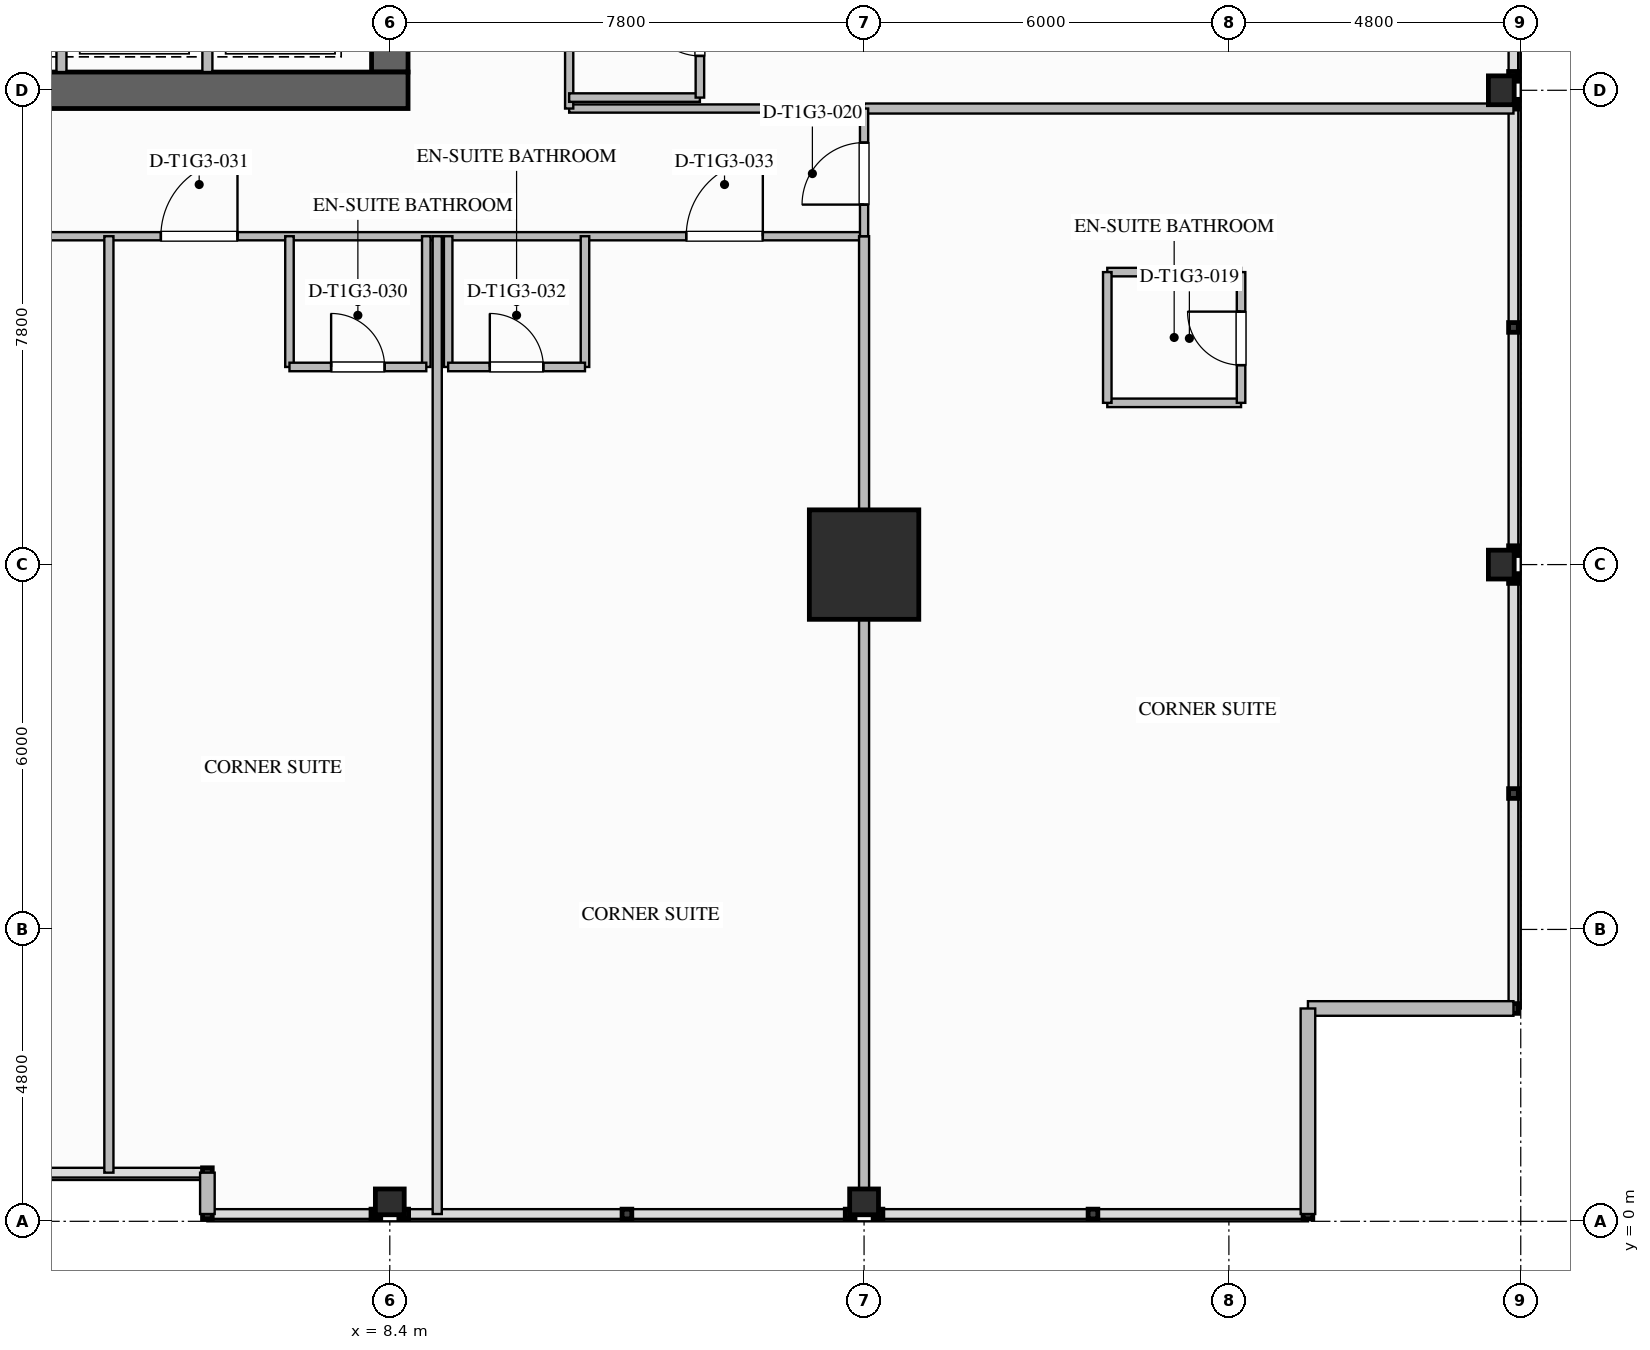
"""IFC4 building model, lengths in metres.
Left out: names, types, materials, properties, quantities, classifications, styles, units other than length and angle.
Written with IfcOpenShell. Run it as: python <this file> out.ifc"""

import sys

from ifc_helpers import new_model, si_unit, direction, frame, frame_2d, origin, origin_2d, place, context, subcontext, project, spatial, rectangle, i_section, extrude, element, fill, save


model = new_model("IFC4")
c1 = context("Model", 3, precision=1e-05, world=origin(), true_north=direction((0.0, 1.0)))
c2 = subcontext(c1, "Body", "Model", "MODEL_VIEW")
j1 = project(units=[si_unit("LENGTHUNIT", "METRE"), si_unit("PLANEANGLEUNIT", "RADIAN")], contexts=[c1])
p1 = place(None, origin())
s1 = spatial("IfcSite", under=j1, at=p1, CompositionType="ELEMENT")
p2 = place(p1, origin())
s2 = spatial("IfcBuilding", under=s1, at=p2, CompositionType="ELEMENT")
p3 = place(p2, frame((0.0, 0.0, 61.2)))
s3 = spatial("IfcBuildingStorey", under=s2, at=p3, CompositionType="ELEMENT", Elevation=61.2)
p4 = place(p3, frame((8.4, 35.1, 0.0), z_axis=(0.0, 0.0, 1.0), x_axis=(0.0, -1.0, 0.0)))
e1 = element("IfcWall", 1, at=p4, inside=s3, PredefinedType="SHEAR", context=c2, shape_type="SweptSolid", body=[
    extrude(rectangle(XDim=16.2, YDim=0.6, at=frame_2d((8.1, 0.0))), origin(), (0.0, 0.0, 1.0), 3.5),
])
p5 = place(p4, frame((3.08, 0.0, 0.0)))
e2 = element("IfcOpeningElement", 2, at=p5, cuts=e1, PredefinedType="OPENING", context=c2, shape_type="SweptSolid", body=[
    extrude(rectangle(XDim=1.12, YDim=2.1, at=frame_2d((0.56, 1.05))), frame((0.0, 0.31, 0.0), z_axis=(0.0, -1.0, 0.0), x_axis=(1.0, 0.0, 0.0)), (0.0, 0.0, 1.0), 0.62),
])
p6 = place(p3, frame((8.7, 18.6, 0.0), z_axis=(0.0, 0.0, 1.0), x_axis=(-1.0, 0.0, 0.0)))
e3 = element("IfcWall", 3, at=p6, inside=s3, PredefinedType="SHEAR", context=c2, shape_type="SweptSolid", body=[
    extrude(rectangle(XDim=17.4, YDim=0.6, at=frame_2d((8.7, 0.0))), origin(), (0.0, 0.0, 1.0), 3.5),
])
p7 = place(p3, frame((16.2, 10.8, 0.0), z_axis=(0.0, 0.0, 1.0), x_axis=(1.0, 0.0, 0.0)))
e4 = element("IfcColumn", 4, at=p7, inside=s3, PredefinedType="COLUMN", context=c2, shape_type="SweptSolid", body=[
    extrude(rectangle(XDim=1.8, YDim=1.8, at=origin_2d()), origin(), (0.0, 0.0, 1.0), 3.5),
])
for number, where, z_axis, x_axis in (
    (5, (26.68, 10.8, 0.0), (0.0, 0.0, 1.0), (1.0, 0.0, 0.0)),
    (6, (26.68, 18.6, 0.0), (0.0, 0.0, 1.0), (1.0, 0.0, 0.0)),
    (7, (8.4, 0.32, 0.0), (0.0, 0.0, 1.0), (0.0, 1.0, 0.0)),
    (8, (16.2, 0.32, 0.0), (0.0, 0.0, 1.0), (0.0, 1.0, 0.0)),
):
    element("IfcColumn", number, at=place(p3, frame(where, z_axis=z_axis, x_axis=x_axis)), inside=s3, PredefinedType="COLUMN", context=c2, shape_type="SweptSolid", body=[
        extrude(i_section(OverallWidth=0.424, OverallDepth=0.474, WebThickness=0.048, FlangeThickness=0.077, FilletRadius=0.03, at=origin_2d()), origin(), (0.0, 0.0, 1.0), 3.497),
    ])
for number, where, z_axis, x_axis in (
    (9, (26.88, 3.5, 0.0), (0.0, 0.0, 1.0), (-1.0, 0.0, 0.0)),
    (10, (23.5, 3.5, 0.0), (0.0, 0.0, 1.0), (0.0, -1.0, 0.0)),
):
    element("IfcWall", number, at=place(p3, frame(where, z_axis=z_axis, x_axis=x_axis)), inside=s3, PredefinedType="STANDARD", context=c2, shape_type="SweptSolid", body=[
        extrude(rectangle(XDim=3.38, YDim=0.24, at=frame_2d((1.69, 0.0))), origin(), (0.0, 0.0, 1.0), 3.24),
    ])
p8 = place(p3, frame((5.4, 0.12, 0.0), z_axis=(0.0, 0.0, 1.0), x_axis=(0.0, 1.0, 0.0)))
e11 = element("IfcWall", 11, at=p8, inside=s3, PredefinedType="STANDARD", context=c2, shape_type="SweptSolid", body=[
    extrude(rectangle(XDim=0.68, YDim=0.24, at=frame_2d((0.34, 0.0))), origin(), (0.0, 0.0, 1.0), 3.24),
])
for number, where, z_axis, x_axis in (
    (12, (3.0, 18.9, 0.0), (0.0, 0.0, 1.0), (0.0, 1.0, 0.0)),
    (13, (5.4, 18.9, 0.0), (0.0, 0.0, 1.0), (0.0, 1.0, 0.0)),
):
    element("IfcWall", number, at=place(p3, frame(where, z_axis=z_axis, x_axis=x_axis)), inside=s3, PredefinedType="PARTITIONING", context=c2, shape_type="SweptSolid", body=[
        extrude(rectangle(XDim=2.88, YDim=0.165, at=frame_2d((1.44, 0.0))), origin(), (0.0, 0.0, 1.0), 3.24),
    ])
p9 = place(p3, frame((-16.2, 16.2, 0.0), z_axis=(0.0, 0.0, 1.0), x_axis=(1.0, 0.0, 0.0)))
e14 = element("IfcWall", 14, at=p9, inside=s3, PredefinedType="PARTITIONING", context=c2, shape_type="SweptSolid", body=[
    extrude(rectangle(XDim=32.4, YDim=0.135, at=frame_2d((16.2, 0.0))), origin(), (0.0, 0.0, 1.0), 3.24),
])
p10 = place(p9, frame((3.285, 0.0, 0.0)))
e15 = element("IfcOpeningElement", 15, at=p10, cuts=e14, PredefinedType="OPENING", context=c2, shape_type="SweptSolid", body=[
    extrude(rectangle(XDim=1.26, YDim=2.2, at=frame_2d((0.63, 1.1))), frame((0.0, 0.077, 0.0), z_axis=(0.0, -1.0, 0.0), x_axis=(1.0, 0.0, 0.0)), (0.0, 0.0, 1.0), 0.155),
])
p11 = place(p9, frame((7.335, 0.0, 0.0)))
e16 = element("IfcOpeningElement", 16, at=p11, cuts=e14, PredefinedType="OPENING", context=c2, shape_type="SweptSolid", body=[
    extrude(rectangle(XDim=1.26, YDim=2.2, at=frame_2d((0.63, 1.1))), frame((0.0, 0.077, 0.0), z_axis=(0.0, -1.0, 0.0), x_axis=(1.0, 0.0, 0.0)), (0.0, 0.0, 1.0), 0.155),
])
p12 = place(p9, frame((15.84, 0.0, 0.0)))
e17 = element("IfcOpeningElement", 17, at=p12, cuts=e14, PredefinedType="OPENING", context=c2, shape_type="SweptSolid", body=[
    extrude(rectangle(XDim=1.26, YDim=2.2, at=frame_2d((0.63, 1.1))), frame((0.0, 0.077, 0.0), z_axis=(0.0, -1.0, 0.0), x_axis=(1.0, 0.0, 0.0)), (0.0, 0.0, 1.0), 0.155),
])
p13 = place(p9, frame((20.835, 0.0, 0.0)))
e18 = element("IfcOpeningElement", 18, at=p13, cuts=e14, PredefinedType="OPENING", context=c2, shape_type="SweptSolid", body=[
    extrude(rectangle(XDim=1.26, YDim=2.2, at=frame_2d((0.63, 1.1))), frame((0.0, 0.077, 0.0), z_axis=(0.0, -1.0, 0.0), x_axis=(1.0, 0.0, 0.0)), (0.0, 0.0, 1.0), 0.155),
])
p14 = place(p9, frame((29.475, 0.0, 0.0)))
e19 = element("IfcOpeningElement", 19, at=p14, cuts=e14, PredefinedType="OPENING", context=c2, shape_type="SweptSolid", body=[
    extrude(rectangle(XDim=1.26, YDim=2.2, at=frame_2d((0.63, 1.1))), frame((0.0, 0.077, 0.0), z_axis=(0.0, -1.0, 0.0), x_axis=(1.0, 0.0, 0.0)), (0.0, 0.0, 1.0), 0.155),
])
p15 = place(p3, frame((11.35, 18.3, 0.0), z_axis=(0.0, 0.0, 1.0), x_axis=(1.0, 0.0, 0.0)))
e20 = element("IfcWall", 20, at=p15, inside=s3, PredefinedType="PARTITIONING", context=c2, shape_type="SweptSolid", body=[
    extrude(rectangle(XDim=4.85, YDim=0.135, at=frame_2d((2.425, 0.0))), origin(), (0.0, 0.0, 1.0), 3.24),
])
p16 = place(p3, frame((11.35, 18.3, 0.0), z_axis=(0.0, 0.0, 1.0), x_axis=(0.0, 1.0, 0.0)))
e21 = element("IfcWall", 21, at=p16, inside=s3, PredefinedType="PARTITIONING", context=c2, shape_type="SweptSolid", body=[
    extrude(rectangle(XDim=17.4, YDim=0.135, at=frame_2d((8.7, 0.0))), origin(), (0.0, 0.0, 1.0), 3.24),
])
p17 = place(p16, frame((3.79, 0.0, 0.0)))
e22 = element("IfcOpeningElement", 22, at=p17, cuts=e21, PredefinedType="OPENING", context=c2, shape_type="SweptSolid", body=[
    extrude(rectangle(XDim=1.26, YDim=2.2, at=frame_2d((0.63, 1.1))), frame((0.0, 0.077, 0.0), z_axis=(0.0, -1.0, 0.0), x_axis=(1.0, 0.0, 0.0)), (0.0, 0.0, 1.0), 0.155),
])
p18 = place(p16, frame((8.419, 0.0, 0.0)))
e23 = element("IfcOpeningElement", 23, at=p18, cuts=e21, PredefinedType="OPENING", context=c2, shape_type="SweptSolid", body=[
    extrude(rectangle(XDim=1.02, YDim=2.15, at=frame_2d((0.51, 1.075))), frame((0.0, 0.077, 0.0), z_axis=(0.0, -1.0, 0.0), x_axis=(1.0, 0.0, 0.0)), (0.0, 0.0, 1.0), 0.155),
])
p19 = place(p16, frame((15.009, 0.0, 0.0)))
e24 = element("IfcOpeningElement", 24, at=p19, cuts=e21, PredefinedType="OPENING", context=c2, shape_type="SweptSolid", body=[
    extrude(rectangle(XDim=1.26, YDim=2.2, at=frame_2d((0.63, 1.1))), frame((0.0, 0.077, 0.0), z_axis=(0.0, -1.0, 0.0), x_axis=(1.0, 0.0, 0.0)), (0.0, 0.0, 1.0), 0.155),
])
p20 = place(p3, frame((16.2, 0.12, 0.0), z_axis=(0.0, 0.0, 1.0), x_axis=(0.0, 1.0, 0.0)))
e25 = element("IfcWall", 25, at=p20, inside=s3, PredefinedType="PARTITIONING", context=c2, shape_type="SweptSolid", body=[
    extrude(rectangle(XDim=16.08, YDim=0.165, at=frame_2d((8.04, 0.0))), origin(), (0.0, 0.0, 1.0), 2.452),
])
p21 = place(p3, frame((16.2, 18.3, 0.0), z_axis=(0.0, 0.0, 1.0), x_axis=(1.0, 0.0, 0.0)))
e26 = element("IfcWall", 26, at=p21, inside=s3, PredefinedType="PARTITIONING", context=c2, shape_type="SweptSolid", body=[
    extrude(rectangle(XDim=10.68, YDim=0.165, at=frame_2d((5.34, 0.0))), origin(), (0.0, 0.0, 1.0), 2.452),
])
p22 = place(p3, frame((16.2, 16.2, 0.0), z_axis=(0.0, 0.0, 1.0), x_axis=(0.0, 1.0, 0.0)))
e27 = element("IfcWall", 27, at=p22, inside=s3, PredefinedType="PARTITIONING", context=c2, shape_type="SweptSolid", body=[
    extrude(rectangle(XDim=2.1, YDim=0.135, at=frame_2d((1.05, 0.0))), origin(), (0.0, 0.0, 1.0), 2.452),
])
p23 = place(p22, frame((0.52, 0.0, 0.0)))
e28 = element("IfcOpeningElement", 28, at=p23, cuts=e27, PredefinedType="OPENING", context=c2, shape_type="SweptSolid", body=[
    extrude(rectangle(XDim=1.02, YDim=2.15, at=frame_2d((0.51, 1.075))), frame((0.0, 0.077, 0.0), z_axis=(0.0, -1.0, 0.0), x_axis=(1.0, 0.0, 0.0)), (0.0, 0.0, 1.0), 0.155),
])
for number, where, z_axis, x_axis in (
    (29, (20.2, 13.46, 0.0), (0.0, 0.0, 1.0), (1.0, 0.0, 0.0)),
    (30, (20.2, 15.61, 0.0), (0.0, 0.0, 1.0), (1.0, 0.0, 0.0)),
):
    element("IfcWall", number, at=place(p3, frame(where, z_axis=z_axis, x_axis=x_axis)), inside=s3, PredefinedType="PLUMBINGWALL", context=c2, shape_type="SweptSolid", body=[
        extrude(rectangle(XDim=2.2, YDim=0.14, at=frame_2d((1.1, 0.0))), origin(), (0.0, 0.0, 1.0), 3.24),
    ])
p24 = place(p3, frame((20.2, 13.46, 0.0), z_axis=(0.0, 0.0, 1.0), x_axis=(0.0, 1.0, 0.0)))
e31 = element("IfcWall", 31, at=p24, inside=s3, PredefinedType="PLUMBINGWALL", context=c2, shape_type="SweptSolid", body=[
    extrude(rectangle(XDim=2.15, YDim=0.14, at=frame_2d((1.075, 0.0))), origin(), (0.0, 0.0, 1.0), 3.24),
])
p25 = place(p3, frame((22.4, 13.46, 0.0), z_axis=(0.0, 0.0, 1.0), x_axis=(0.0, 1.0, 0.0)))
e32 = element("IfcWall", 32, at=p25, inside=s3, PredefinedType="PLUMBINGWALL", context=c2, shape_type="SweptSolid", body=[
    extrude(rectangle(XDim=2.15, YDim=0.14, at=frame_2d((1.075, 0.0))), origin(), (0.0, 0.0, 1.0), 3.24),
])
p26 = place(p25, frame((0.62, 0.0, 0.0)))
e33 = element("IfcOpeningElement", 33, at=p26, cuts=e32, PredefinedType="OPENING", context=c2, shape_type="SweptSolid", body=[
    extrude(rectangle(XDim=0.88, YDim=2.1, at=frame_2d((0.44, 1.05))), frame((0.0, 0.08, 0.0), z_axis=(0.0, -1.0, 0.0), x_axis=(1.0, 0.0, 0.0)), (0.0, 0.0, 1.0), 0.16),
])
p27 = place(p3, frame((3.78, 0.8, 0.0), z_axis=(0.0, 0.0, 1.0), x_axis=(0.0, 1.0, 0.0)))
e34 = element("IfcWall", 34, at=p27, inside=s3, PredefinedType="PARTITIONING", context=c2, shape_type="SweptSolid", body=[
    extrude(rectangle(XDim=15.4, YDim=0.15, at=frame_2d((7.7, 0.0))), origin(), (0.0, 0.0, 1.0), 3.24),
])
for number, where, z_axis, x_axis in (
    (35, (6.75, 16.2, 0.0), (0.0, 0.0, 1.0), (0.0, -1.0, 0.0)),
    (36, (9.0, 16.2, 0.0), (0.0, 0.0, 1.0), (0.0, -1.0, 0.0)),
):
    element("IfcWall", number, at=place(p3, frame(where, z_axis=z_axis, x_axis=x_axis)), inside=s3, PredefinedType="PLUMBINGWALL", context=c2, shape_type="SweptSolid", body=[
        extrude(rectangle(XDim=2.15, YDim=0.14, at=frame_2d((1.075, 0.0))), origin(), (0.0, 0.0, 1.0), 3.24),
    ])
p28 = place(p3, frame((6.75, 14.05, 0.0), z_axis=(0.0, 0.0, 1.0), x_axis=(1.0, 0.0, 0.0)))
e37 = element("IfcWall", 37, at=p28, inside=s3, PredefinedType="PLUMBINGWALL", context=c2, shape_type="SweptSolid", body=[
    extrude(rectangle(XDim=2.25, YDim=0.14, at=frame_2d((1.125, 0.0))), origin(), (0.0, 0.0, 1.0), 3.24),
])
p29 = place(p28, frame((0.685, 0.0, 0.0)))
e38 = element("IfcOpeningElement", 38, at=p29, cuts=e37, PredefinedType="OPENING", context=c2, shape_type="SweptSolid", body=[
    extrude(rectangle(XDim=0.88, YDim=2.1, at=frame_2d((0.44, 1.05))), frame((0.0, 0.08, 0.0), z_axis=(0.0, -1.0, 0.0), x_axis=(1.0, 0.0, 0.0)), (0.0, 0.0, 1.0), 0.16),
])
p30 = place(p3, frame((9.18, 0.12, 0.0), z_axis=(0.0, 0.0, 1.0), x_axis=(0.0, 1.0, 0.0)))
e39 = element("IfcWall", 39, at=p30, inside=s3, PredefinedType="PARTITIONING", context=c2, shape_type="SweptSolid", body=[
    extrude(rectangle(XDim=16.08, YDim=0.15, at=frame_2d((8.04, 0.0))), origin(), (0.0, 0.0, 1.0), 3.24),
])
for number, where, z_axis, x_axis in (
    (40, (9.36, 16.2, 0.0), (0.0, 0.0, 1.0), (0.0, -1.0, 0.0)),
    (41, (11.61, 16.2, 0.0), (0.0, 0.0, 1.0), (0.0, -1.0, 0.0)),
):
    element("IfcWall", number, at=place(p3, frame(where, z_axis=z_axis, x_axis=x_axis)), inside=s3, PredefinedType="PLUMBINGWALL", context=c2, shape_type="SweptSolid", body=[
        extrude(rectangle(XDim=2.15, YDim=0.14, at=frame_2d((1.075, 0.0))), origin(), (0.0, 0.0, 1.0), 3.24),
    ])
p31 = place(p3, frame((9.36, 14.05, 0.0), z_axis=(0.0, 0.0, 1.0), x_axis=(1.0, 0.0, 0.0)))
e42 = element("IfcWall", 42, at=p31, inside=s3, PredefinedType="PLUMBINGWALL", context=c2, shape_type="SweptSolid", body=[
    extrude(rectangle(XDim=2.25, YDim=0.14, at=frame_2d((1.125, 0.0))), origin(), (0.0, 0.0, 1.0), 3.24),
])
p32 = place(p31, frame((0.685, 0.0, 0.0)))
e43 = element("IfcOpeningElement", 43, at=p32, cuts=e42, PredefinedType="OPENING", context=c2, shape_type="SweptSolid", body=[
    extrude(rectangle(XDim=0.88, YDim=2.1, at=frame_2d((0.44, 1.05))), frame((0.0, 0.08, 0.0), z_axis=(0.0, -1.0, 0.0), x_axis=(1.0, 0.0, 0.0)), (0.0, 0.0, 1.0), 0.16),
])
p33 = place(p3, frame((11.35, 18.48, 0.0), z_axis=(0.0, 0.0, 1.0), x_axis=(1.0, 0.0, 0.0)))
e44 = element("IfcWall", 44, at=p33, inside=s3, PredefinedType="PLUMBINGWALL", context=c2, shape_type="SweptSolid", body=[
    extrude(rectangle(XDim=2.15, YDim=0.14, at=frame_2d((1.075, 0.0))), origin(), (0.0, 0.0, 1.0), 2.617),
])
p34 = place(p3, frame((13.5, 18.48, 0.0), z_axis=(0.0, 0.0, 1.0), x_axis=(0.0, 1.0, 0.0)))
e45 = element("IfcWall", 45, at=p34, inside=s3, PredefinedType="PLUMBINGWALL", context=c2, shape_type="SweptSolid", body=[
    extrude(rectangle(XDim=2.25, YDim=0.14, at=frame_2d((1.125, 0.0))), origin(), (0.0, 0.0, 1.0), 3.24),
])
p35 = place(p34, frame((0.685, 0.0, 0.0)))
e46 = element("IfcOpeningElement", 46, at=p35, cuts=e45, PredefinedType="OPENING", context=c2, shape_type="SweptSolid", body=[
    extrude(rectangle(XDim=0.88, YDim=2.1, at=frame_2d((0.44, 1.05))), frame((0.0, 0.08, 0.0), z_axis=(0.0, -1.0, 0.0), x_axis=(1.0, 0.0, 0.0)), (0.0, 0.0, 1.0), 0.16),
])
p36 = place(p26, origin())
e47 = element("IfcDoor", 47, at=p36, inside=s3, OperationType="SINGLE_SWING_RIGHT", PredefinedType="DOOR", context=c2, shape_type="SweptSolid", body=[
    extrude(rectangle(XDim=0.88, YDim=2.1, at=frame_2d((0.44, 1.05))), frame((0.0, 0.025, 0.0), z_axis=(0.0, -1.0, 0.0), x_axis=(1.0, 0.0, 0.0)), (0.0, 0.0, 1.0), 0.05),
])
fill(e33, e47)
p37 = place(p23, origin())
e48 = element("IfcDoor", 48, at=p37, inside=s3, OperationType="SINGLE_SWING_LEFT", PredefinedType="DOOR", context=c2, shape_type="SweptSolid", body=[
    extrude(rectangle(XDim=1.02, YDim=2.15, at=frame_2d((0.51, 1.075))), frame((0.0, 0.025, 0.0), z_axis=(0.0, -1.0, 0.0), x_axis=(1.0, 0.0, 0.0)), (0.0, 0.0, 1.0), 0.05),
])
fill(e28, e48)
p38 = place(p29, origin())
e49 = element("IfcDoor", 49, at=p38, inside=s3, OperationType="SINGLE_SWING_LEFT", PredefinedType="DOOR", context=c2, shape_type="SweptSolid", body=[
    extrude(rectangle(XDim=0.88, YDim=2.1, at=frame_2d((0.44, 1.05))), frame((0.0, 0.025, 0.0), z_axis=(0.0, -1.0, 0.0), x_axis=(1.0, 0.0, 0.0)), (0.0, 0.0, 1.0), 0.05),
])
fill(e38, e49)
p39 = place(p13, origin())
e50 = element("IfcDoor", 50, at=p39, inside=s3, OperationType="SINGLE_SWING_RIGHT", PredefinedType="DOOR", context=c2, shape_type="SweptSolid", body=[
    extrude(rectangle(XDim=1.26, YDim=2.2, at=frame_2d((0.63, 1.1))), frame((0.0, 0.025, 0.0), z_axis=(0.0, -1.0, 0.0), x_axis=(1.0, 0.0, 0.0)), (0.0, 0.0, 1.0), 0.05),
])
fill(e18, e50)
p40 = place(p32, origin())
e51 = element("IfcDoor", 51, at=p40, inside=s3, OperationType="SINGLE_SWING_LEFT", PredefinedType="DOOR", context=c2, shape_type="SweptSolid", body=[
    extrude(rectangle(XDim=0.88, YDim=2.1, at=frame_2d((0.44, 1.05))), frame((0.0, 0.025, 0.0), z_axis=(0.0, -1.0, 0.0), x_axis=(1.0, 0.0, 0.0)), (0.0, 0.0, 1.0), 0.05),
])
fill(e43, e51)
p41 = place(p14, origin())
e52 = element("IfcDoor", 52, at=p41, inside=s3, OperationType="SINGLE_SWING_RIGHT", PredefinedType="DOOR", context=c2, shape_type="SweptSolid", body=[
    extrude(rectangle(XDim=1.26, YDim=2.2, at=frame_2d((0.63, 1.1))), frame((0.0, 0.025, 0.0), z_axis=(0.0, -1.0, 0.0), x_axis=(1.0, 0.0, 0.0)), (0.0, 0.0, 1.0), 0.05),
])
fill(e19, e52)
p42 = place(p35, origin())
e53 = element("IfcDoor", 53, at=p42, inside=s3, OperationType="SINGLE_SWING_RIGHT", PredefinedType="DOOR", context=c2, shape_type="SweptSolid", body=[
    extrude(rectangle(XDim=0.88, YDim=2.1, at=frame_2d((0.44, 1.05))), frame((0.0, 0.025, 0.0), z_axis=(0.0, -1.0, 0.0), x_axis=(1.0, 0.0, 0.0)), (0.0, 0.0, 1.0), 0.05),
])
fill(e46, e53)
save(model, sys.argv[1])
